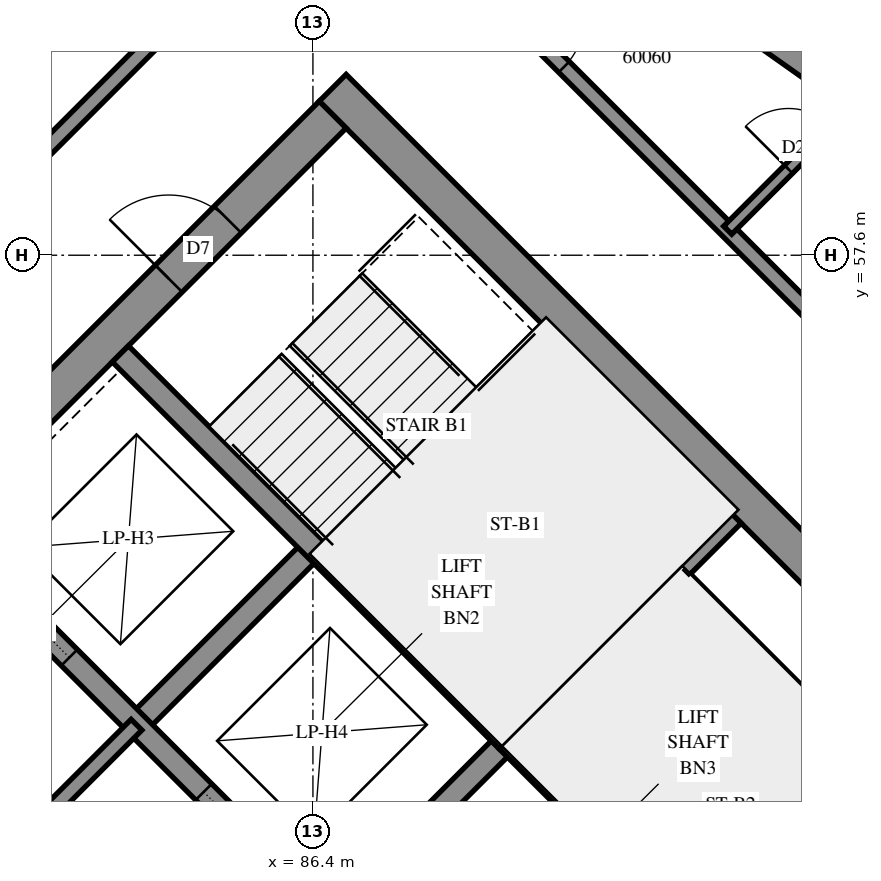
"""IFC4 building model, lengths in metres.
Left out: names, types, materials, properties, quantities, classifications, styles, units other than length and angle.
Written with IfcOpenShell. Run it as: python <this file> out.ifc"""

import sys

from ifc_helpers import new_model, si_unit, direction, frame, frame_2d, origin, place, context, subcontext, project, spatial, polyline, rectangle, outline, extrude, element, fill, save


model = new_model("IFC4")
c1 = context("Model", 3, precision=1e-05, world=origin(), true_north=direction((0.0, 1.0)))
c2 = subcontext(c1, "Body", "Model", "MODEL_VIEW")
j1 = project(units=[si_unit("LENGTHUNIT", "METRE"), si_unit("PLANEANGLEUNIT", "RADIAN")], contexts=[c1])
p1 = place(None, origin())
s1 = spatial("IfcSite", under=j1, at=p1, CompositionType="ELEMENT")
p2 = place(p1, origin())
s2 = spatial("IfcBuilding", under=s1, at=p2, CompositionType="ELEMENT")
p3 = place(p2, frame((0.0, 0.0, 220.2)))
s3 = spatial("IfcBuildingStorey", under=s2, at=p3, CompositionType="ELEMENT", Elevation=220.2)
p4 = place(p3, frame((86.66, 59.802, -0.3), z_axis=(0.0, 0.0, 1.0), x_axis=(0.7071067812, -0.7071067812, 0.0)))
e1 = element("IfcWall", 1, at=p4, inside=s3, PredefinedType="SHEAR", context=c2, shape_type="SweptSolid", body=[
    extrude(rectangle(XDim=15.4, YDim=0.5, at=frame_2d((7.7, 0.0))), origin(), (0.0, 0.0, 1.0), 2.7),
])
p5 = place(p4, frame((10.5, 0.0, 0.3)))
e2 = element("IfcOpeningElement", 2, at=p5, cuts=e1, PredefinedType="OPENING", context=c2, shape_type="SweptSolid", body=[
    extrude(rectangle(XDim=0.8, YDim=2.1, at=frame_2d((0.4, 1.05))), frame((0.0, 0.26, 0.0), z_axis=(0.0, -1.0, 0.0), x_axis=(1.0, 0.0, 0.0)), (0.0, 0.0, 1.0), 0.52),
])
p6 = place(p3, frame((76.478, 49.267, -0.3), z_axis=(0.0, 0.0, 1.0), x_axis=(0.7071067812, 0.7071067812, 0.0)))
e3 = element("IfcWall", 3, at=p6, inside=s3, PredefinedType="SHEAR", context=c2, shape_type="SweptSolid", body=[
    extrude(rectangle(XDim=14.4, YDim=0.5, at=frame_2d((7.2, 0.0))), origin(), (0.0, 0.0, 1.0), 2.7),
])
p7 = place(p6, frame((4.55, 0.0, 0.3)))
e4 = element("IfcOpeningElement", 4, at=p7, cuts=e3, PredefinedType="OPENING", context=c2, shape_type="SweptSolid", body=[
    extrude(rectangle(XDim=1.1, YDim=2.1, at=frame_2d((0.55, 1.05))), frame((0.0, 0.26, 0.0), z_axis=(0.0, -1.0, 0.0), x_axis=(1.0, 0.0, 0.0)), (0.0, 0.0, 1.0), 0.52),
])
p8 = place(p6, frame((11.35, 0.0, 0.3)))
e5 = element("IfcOpeningElement", 5, at=p8, cuts=e3, PredefinedType="OPENING", context=c2, shape_type="SweptSolid", body=[
    extrude(rectangle(XDim=1.1, YDim=2.1, at=frame_2d((0.55, 1.05))), frame((0.0, 0.26, 0.0), z_axis=(0.0, -1.0, 0.0), x_axis=(1.0, 0.0, 0.0)), (0.0, 0.0, 1.0), 0.52),
])
p9 = place(p3, frame((84.079, 51.423, 0.0), z_axis=(0.0, 0.0, 1.0), x_axis=(0.7071219326, 0.7070916295, 0.0)))
e6 = element("IfcWall", 6, at=p9, inside=s3, PredefinedType="SOLIDWALL", context=c2, shape_type="SweptSolid", body=[
    extrude(rectangle(XDim=3.3, YDim=0.3, at=frame_2d((1.65, 0.0))), origin(), (0.0, 0.0, 1.0), 3.1),
])
p10 = place(p3, frame((86.625, 48.878, 0.0), z_axis=(0.0, 0.0, 1.0), x_axis=(0.7071067812, 0.7071067812, 0.0)))
e7 = element("IfcWall", 7, at=p10, inside=s3, PredefinedType="SOLIDWALL", context=c2, shape_type="SweptSolid", body=[
    extrude(rectangle(XDim=3.3, YDim=0.3, at=frame_2d((1.65, 0.0))), origin(), (0.0, 0.0, 1.0), 3.1),
])
p11 = place(p3, frame((78.988, 51.423, 0.0), z_axis=(0.0, 0.0, 1.0), x_axis=(0.7071067812, -0.7071067812, 0.0)))
e8 = element("IfcWall", 8, at=p11, inside=s3, PredefinedType="SOLIDWALL", context=c2, shape_type="SweptSolid", body=[
    extrude(rectangle(XDim=14.4, YDim=0.3, at=frame_2d((7.2, 0.0))), origin(), (0.0, 0.0, 1.0), 3.1),
])
p12 = place(p11, frame((1.35, 0.0, 0.0)))
e9 = element("IfcOpeningElement", 9, at=p12, cuts=e8, PredefinedType="OPENING", context=c2, shape_type="SweptSolid", body=[
    extrude(rectangle(XDim=0.9, YDim=2.1, at=frame_2d((0.45, 1.05))), frame((0.0, 0.16, 0.0), z_axis=(0.0, -1.0, 0.0), x_axis=(1.0, 0.0, 0.0)), (0.0, 0.0, 1.0), 0.32),
])
p13 = place(p11, frame((4.95, 0.0, 0.0)))
e10 = element("IfcOpeningElement", 10, at=p13, cuts=e8, PredefinedType="OPENING", context=c2, shape_type="SweptSolid", body=[
    extrude(rectangle(XDim=0.9, YDim=2.1, at=frame_2d((0.45, 1.05))), frame((0.0, 0.16, 0.0), z_axis=(0.0, -1.0, 0.0), x_axis=(1.0, 0.0, 0.0)), (0.0, 0.0, 1.0), 0.32),
])
p14 = place(p11, frame((8.55, 0.0, 0.0)))
e11 = element("IfcOpeningElement", 11, at=p14, cuts=e8, PredefinedType="OPENING", context=c2, shape_type="SweptSolid", body=[
    extrude(rectangle(XDim=0.9, YDim=2.1, at=frame_2d((0.45, 1.05))), frame((0.0, 0.16, 0.0), z_axis=(0.0, -1.0, 0.0), x_axis=(1.0, 0.0, 0.0)), (0.0, 0.0, 1.0), 0.32),
])
p15 = place(p11, frame((12.05, 0.0, 0.0)))
e12 = element("IfcOpeningElement", 12, at=p15, cuts=e8, PredefinedType="OPENING", context=c2, shape_type="SweptSolid", body=[
    extrude(rectangle(XDim=1.1, YDim=2.1, at=frame_2d((0.55, 1.05))), frame((0.0, 0.16, 0.0), z_axis=(0.0, -1.0, 0.0), x_axis=(1.0, 0.0, 0.0)), (0.0, 0.0, 1.0), 0.32),
])
p16 = place(p3, frame((81.534, 53.969, 0.0), z_axis=(0.0, 0.0, 1.0), x_axis=(0.707103309, -0.7071102534, 0.0)))
e13 = element("IfcWall", 13, at=p16, inside=s3, PredefinedType="SOLIDWALL", context=c2, shape_type="SweptSolid", body=[
    extrude(rectangle(XDim=14.4, YDim=0.3, at=frame_2d((7.2, 0.0))), origin(), (0.0, 0.0, 1.0), 3.1),
])
p17 = place(p16, frame((1.25, 0.0, 0.0)))
e14 = element("IfcOpeningElement", 14, at=p17, cuts=e13, PredefinedType="OPENING", context=c2, shape_type="SweptSolid", body=[
    extrude(rectangle(XDim=1.1, YDim=2.1, at=frame_2d((0.55, 1.05))), frame((0.0, 0.16, 0.0), z_axis=(0.0, -1.0, 0.0), x_axis=(1.0, 0.0, 0.0)), (0.0, 0.0, 1.0), 0.32),
])
p18 = place(p16, frame((4.85, 0.0, 0.0)))
e15 = element("IfcOpeningElement", 15, at=p18, cuts=e13, PredefinedType="OPENING", context=c2, shape_type="SweptSolid", body=[
    extrude(rectangle(XDim=1.1, YDim=2.1, at=frame_2d((0.55, 1.05))), frame((0.0, 0.16, 0.0), z_axis=(0.0, -1.0, 0.0), x_axis=(1.0, 0.0, 0.0)), (0.0, 0.0, 1.0), 0.32),
])
p19 = place(p16, frame((8.45, 0.0, 0.0)))
e16 = element("IfcOpeningElement", 16, at=p19, cuts=e13, PredefinedType="OPENING", context=c2, shape_type="SweptSolid", body=[
    extrude(rectangle(XDim=1.1, YDim=2.1, at=frame_2d((0.55, 1.05))), frame((0.0, 0.16, 0.0), z_axis=(0.0, -1.0, 0.0), x_axis=(1.0, 0.0, 0.0)), (0.0, 0.0, 1.0), 0.32),
])
p20 = place(p16, frame((12.05, 0.0, 0.0)))
e17 = element("IfcOpeningElement", 17, at=p20, cuts=e13, PredefinedType="OPENING", context=c2, shape_type="SweptSolid", body=[
    extrude(rectangle(XDim=1.1, YDim=2.1, at=frame_2d((0.55, 1.05))), frame((0.0, 0.16, 0.0), z_axis=(0.0, -1.0, 0.0), x_axis=(1.0, 0.0, 0.0)), (0.0, 0.0, 1.0), 0.32),
])
for number, where, z_axis, x_axis in (
    (18, (83.867, 56.302, 0.0), (0.0, 0.0, 1.0), (0.707, -0.707, 0.0)),
    (19, (88.958, 51.211, 0.0), (0.0, 0.0, 1.0), (0.707, -0.707, 0.0)),
):
    element("IfcWall", number, at=place(p3, frame(where, z_axis=z_axis, x_axis=x_axis)), inside=s3, PredefinedType="SOLIDWALL", context=c2, shape_type="SweptSolid", body=[
        extrude(rectangle(XDim=7.2, YDim=0.3, at=frame_2d((3.6, 0.0))), origin(), (0.0, 0.0, 1.0), 3.1),
    ])
p21 = place(p3, frame((88.958, 51.211, 0.0), z_axis=(0.0, 0.0, 1.0), x_axis=(0.7071067812, 0.7071067812, 0.0)))
e20 = element("IfcWall", 20, at=p21, inside=s3, PredefinedType="SOLIDWALL", context=c2, shape_type="SweptSolid", body=[
    extrude(rectangle(XDim=4.2, YDim=0.3, at=frame_2d((2.1, 0.0))), origin(), (0.0, 0.0, 1.0), 3.1),
])
p22 = place(p3, frame((93.742, 59.605, 0.0), z_axis=(0.0, 0.0, 1.0), x_axis=(-0.8163684441, 0.5775314394, 0.0)))
e21 = element("IfcWall", 21, at=p22, inside=s3, PredefinedType="SOLIDWALL", context=c2, shape_type="SweptSolid", body=[
    extrude(outline(polyline([(-0.043, -0.25), (3.344, -0.25), (3.43, 0.25), (0.043, 0.25), (-0.043, -0.25)])), origin(), (0.0, 0.0, 1.0), 3.1),
])
p23 = place(p22, frame((1.525, 0.0, 0.45)))
e22 = element("IfcOpeningElement", 22, at=p23, cuts=e21, PredefinedType="OPENING", context=c2, shape_type="SweptSolid", body=[
    extrude(rectangle(XDim=1.2, YDim=2.5, at=frame_2d((0.6, 1.25))), frame((0.0, 0.26, 0.0), z_axis=(0.0, -1.0, 0.0), x_axis=(1.0, 0.0, 0.0)), (0.0, 0.0, 1.0), 0.52),
])
p24 = place(p3, frame((91.313, 53.354, 0.0), z_axis=(0.0, 0.0, 1.0), x_axis=(0.7071147811, -0.7070987812, 0.0)))
e23 = element("IfcWall", 23, at=p24, inside=s3, PredefinedType="PARTITIONING", context=c2, shape_type="SweptSolid", body=[
    extrude(rectangle(XDim=6.25, YDim=0.15, at=frame_2d((3.125, 0.0))), origin(), (0.0, 0.0, 1.0), 3.1),
])
p25 = place(p3, frame((81.534, 48.878, 0.0), z_axis=(0.0, 0.0, 1.0), x_axis=(0.707092892, 0.7071206701, 0.0)))
e24 = element("IfcWall", 24, at=p25, inside=s3, PredefinedType="PARTITIONING", context=c2, shape_type="SweptSolid", body=[
    extrude(rectangle(XDim=3.6, YDim=0.2, at=frame_2d((1.8, 0.0))), origin(), (0.0, 0.0, 1.0), 3.1),
])
p26 = place(p3, frame((86.835, 62.945, 0.0), z_axis=(0.0, 0.0, 1.0), x_axis=(0.7072533434, -0.7069601886, 0.0)))
e25 = element("IfcWall", 25, at=p26, inside=s3, PredefinedType="PARTITIONING", context=c2, shape_type="SweptSolid", body=[
    extrude(rectangle(XDim=11.598, YDim=0.2, at=frame_2d((5.799, 0.0))), origin(), (0.0, 0.0, 1.0), 3.1),
])
p27 = place(p26, frame((3.156, 0.0, 0.0)))
e26 = element("IfcOpeningElement", 26, at=p27, cuts=e25, PredefinedType="OPENING", context=c2, shape_type="SweptSolid", body=[
    extrude(rectangle(XDim=0.9, YDim=2.1, at=frame_2d((0.45, 1.05))), frame((0.0, 0.11, 0.0), z_axis=(0.0, -1.0, 0.0), x_axis=(1.0, 0.0, 0.0)), (0.0, 0.0, 1.0), 0.22),
])
p28 = place(p3, frame((79.799, 55.913, 0.0), z_axis=(0.0, 0.0, 1.0), x_axis=(0.7071067812, 0.7071067812, 0.0)))
e27 = element("IfcWall", 27, at=p28, inside=s3, PredefinedType="PARTITIONING", context=c2, shape_type="SweptSolid", body=[
    extrude(rectangle(XDim=9.95, YDim=0.2, at=frame_2d((4.975, 0.0))), origin(), (0.0, 0.0, 1.0), 3.1),
])
p29 = place(p28, frame((0.927, 0.0, 0.0)))
e28 = element("IfcOpeningElement", 28, at=p29, cuts=e27, PredefinedType="OPENING", context=c2, shape_type="SweptSolid", body=[
    extrude(rectangle(XDim=1.0, YDim=2.1, at=frame_2d((0.5, 1.05))), frame((0.0, 0.11, 0.0), z_axis=(0.0, -1.0, 0.0), x_axis=(1.0, 0.0, 0.0)), (0.0, 0.0, 1.0), 0.22),
])
p30 = place(p3, frame((91.857, 57.929, 0.0), z_axis=(0.0, 0.0, 1.0), x_axis=(0.7066823676, 0.7075309402, 0.0)))
e29 = element("IfcWall", 29, at=p30, inside=s3, PredefinedType="PARTITIONING", context=c2, shape_type="SweptSolid", body=[
    extrude(rectangle(XDim=2.239, YDim=0.15, at=frame_2d((1.12, 0.0))), origin(), (0.0, 0.0, 1.0), 3.1),
])
p31 = place(p30, frame((1.133, 0.0, 0.0)))
e30 = element("IfcOpeningElement", 30, at=p31, cuts=e29, PredefinedType="OPENING", context=c2, shape_type="SweptSolid", body=[
    extrude(rectangle(XDim=0.8, YDim=2.1, at=frame_2d((0.4, 1.05))), frame((0.0, 0.085, 0.0), z_axis=(0.0, -1.0, 0.0), x_axis=(1.0, 0.0, 0.0)), (0.0, 0.0, 1.0), 0.17),
])
p32 = place(p8, origin())
e31 = element("IfcDoor", 31, at=p32, inside=s3, OperationType="SINGLE_SWING_LEFT", PredefinedType="DOOR", context=c2, shape_type="SweptSolid", body=[
    extrude(rectangle(XDim=1.1, YDim=2.1, at=frame_2d((0.55, 1.05))), frame((0.0, 0.025, 0.0), z_axis=(0.0, -1.0, 0.0), x_axis=(1.0, 0.0, 0.0)), (0.0, 0.0, 1.0), 0.05),
])
fill(e5, e31)
p33 = place(p17, origin())
e32 = element("IfcDoor", 32, at=p33, inside=s3, OperationType="SLIDING_TO_LEFT", PredefinedType="DOOR", context=c2, shape_type="SweptSolid", body=[
    extrude(rectangle(XDim=1.1, YDim=2.1, at=frame_2d((0.55, 1.05))), frame((0.0, 0.025, 0.0), z_axis=(0.0, -1.0, 0.0), x_axis=(1.0, 0.0, 0.0)), (0.0, 0.0, 1.0), 0.05),
])
fill(e14, e32)
p34 = place(p18, origin())
e33 = element("IfcDoor", 33, at=p34, inside=s3, OperationType="SLIDING_TO_RIGHT", PredefinedType="DOOR", context=c2, shape_type="SweptSolid", body=[
    extrude(rectangle(XDim=1.1, YDim=2.1, at=frame_2d((0.55, 1.05))), frame((0.0, 0.025, 0.0), z_axis=(0.0, -1.0, 0.0), x_axis=(1.0, 0.0, 0.0)), (0.0, 0.0, 1.0), 0.05),
])
fill(e15, e33)
p35 = place(p27, origin())
e34 = element("IfcDoor", 34, at=p35, inside=s3, OperationType="SINGLE_SWING_LEFT", PredefinedType="DOOR", context=c2, shape_type="SweptSolid", body=[
    extrude(rectangle(XDim=0.9, YDim=2.1, at=frame_2d((0.45, 1.05))), frame((0.0, 0.025, 0.0), z_axis=(0.0, -1.0, 0.0), x_axis=(1.0, 0.0, 0.0)), (0.0, 0.0, 1.0), 0.05),
])
fill(e26, e34)
p36 = place(p31, origin())
e35 = element("IfcDoor", 35, at=p36, inside=s3, OperationType="SINGLE_SWING_RIGHT", PredefinedType="DOOR", context=c2, shape_type="SweptSolid", body=[
    extrude(rectangle(XDim=0.8, YDim=2.1, at=frame_2d((0.4, 1.05))), frame((0.0, 0.025, 0.0), z_axis=(0.0, -1.0, 0.0), x_axis=(1.0, 0.0, 0.0)), (0.0, 0.0, 1.0), 0.05),
])
fill(e30, e35)
save(model, sys.argv[1])
